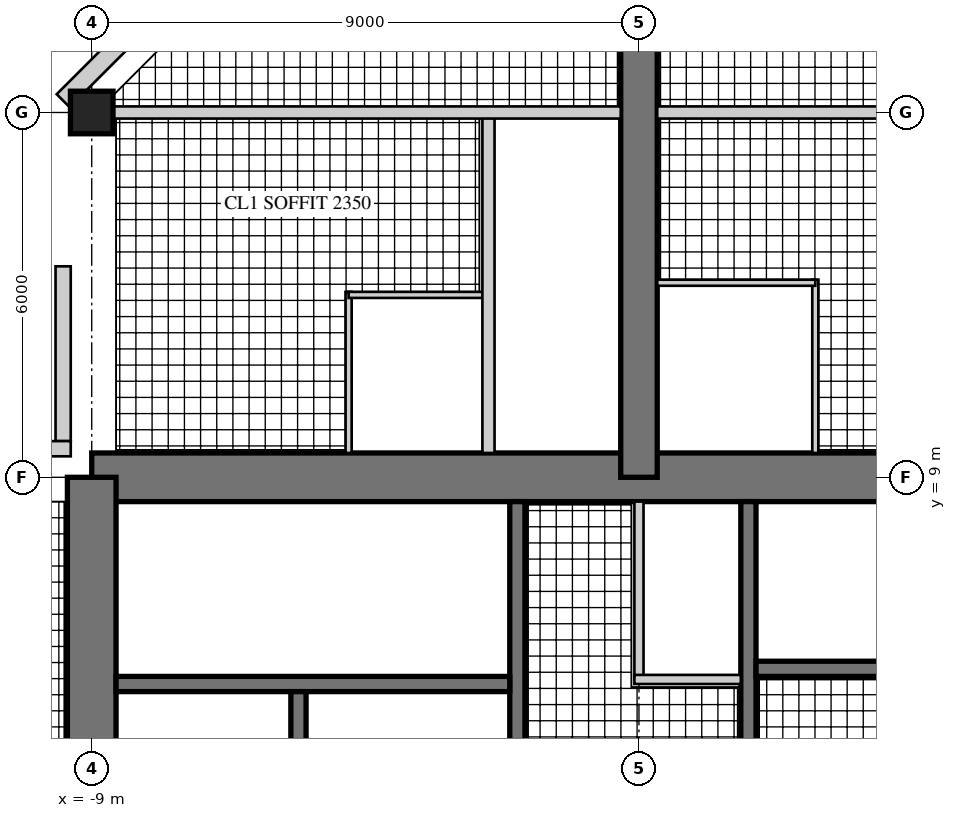
"""IFC4 building model, lengths in metres.
Left out: names, types, materials, properties, quantities, classifications, styles, units other than length and angle.
Written with IfcOpenShell. Run it as: python <this file> out.ifc"""

import sys

from ifc_helpers import new_model, si_unit, direction, frame, frame_2d, origin, origin_2d, place, context, subcontext, project, spatial, rectangle, hollow_rectangle, extrude, element, fill, save


model = new_model("IFC4")
c1 = context("Model", 3, precision=1e-05, world=origin(), true_north=direction((0.0, 1.0)))
c2 = subcontext(c1, "Body", "Model", "MODEL_VIEW")
j1 = project(units=[si_unit("LENGTHUNIT", "METRE"), si_unit("PLANEANGLEUNIT", "RADIAN")], contexts=[c1])
p1 = place(None, origin())
s1 = spatial("IfcSite", under=j1, at=p1, CompositionType="ELEMENT")
p2 = place(p1, origin())
s2 = spatial("IfcBuilding", under=s1, at=p2, CompositionType="ELEMENT")
p3 = place(p2, frame((0.0, 0.0, 267.9)))
s3 = spatial("IfcBuildingStorey", under=s2, at=p3, CompositionType="ELEMENT", Elevation=267.9)
p4 = place(p3, frame((9.0, 9.0, 0.0), z_axis=(0.0, 0.0, 1.0), x_axis=(-1.0, 0.0, 0.0)))
e1 = element("IfcWall", 1, at=p4, inside=s3, PredefinedType="SHEAR", context=c2, shape_type="SweptSolid", body=[
    extrude(rectangle(XDim=18.0, YDim=0.8, at=frame_2d((9.0, 0.0))), origin(), (0.0, 0.0, 1.0), 3.4),
])
p5 = place(p4, frame((9.8, 0.0, 0.0)))
e2 = element("IfcOpeningElement", 2, at=p5, cuts=e1, PredefinedType="OPENING", context=c2, shape_type="SweptSolid", body=[
    extrude(rectangle(XDim=1.0, YDim=2.4, at=frame_2d((0.5, 1.2))), frame((0.0, 0.41, 0.0), z_axis=(0.0, -1.0, 0.0), x_axis=(1.0, 0.0, 0.0)), (0.0, 0.0, 1.0), 0.82),
])
p6 = place(p3, frame((-9.0, 9.0, 0.0), z_axis=(0.0, 0.0, 1.0), x_axis=(0.0, -1.0, 0.0)))
e3 = element("IfcWall", 3, at=p6, inside=s3, PredefinedType="SHEAR", context=c2, shape_type="SweptSolid", body=[
    extrude(rectangle(XDim=18.0, YDim=0.8, at=frame_2d((9.0, 0.0))), origin(), (0.0, 0.0, 1.0), 3.4),
])
p7 = place(p6, frame((9.8, 0.0, 0.0)))
e4 = element("IfcOpeningElement", 4, at=p7, cuts=e3, PredefinedType="OPENING", context=c2, shape_type="SweptSolid", body=[
    extrude(rectangle(XDim=1.0, YDim=2.4, at=frame_2d((0.5, 1.2))), frame((0.0, 0.41, 0.0), z_axis=(0.0, -1.0, 0.0), x_axis=(1.0, 0.0, 0.0)), (0.0, 0.0, 1.0), 0.82),
])
p8 = place(p3, frame((1.8, 1.875, 0.0), z_axis=(0.0, 0.0, 1.0), x_axis=(0.0, 1.0, 0.0)))
e5 = element("IfcWall", 5, at=p8, inside=s3, PredefinedType="SHEAR", context=c2, shape_type="SweptSolid", body=[
    extrude(rectangle(XDim=6.725, YDim=0.25, at=frame_2d((3.363, 0.0))), origin(), (0.0, 0.0, 1.0), 3.4),
])
p9 = place(p8, frame((1.875, 0.0, 0.0)))
e6 = element("IfcOpeningElement", 6, at=p9, cuts=e5, PredefinedType="OPENING", context=c2, shape_type="SweptSolid", body=[
    extrude(rectangle(XDim=1.6, YDim=2.4, at=frame_2d((0.8, 1.2))), frame((0.0, 0.135, 0.0), z_axis=(0.0, -1.0, 0.0), x_axis=(1.0, 0.0, 0.0)), (0.0, 0.0, 1.0), 0.27),
])
p10 = place(p3, frame((1.925, 5.85, 0.0), z_axis=(0.0, 0.0, 1.0), x_axis=(1.0, 0.0, 0.0)))
e7 = element("IfcWall", 7, at=p10, inside=s3, PredefinedType="SHEAR", context=c2, shape_type="SweptSolid", body=[
    extrude(rectangle(XDim=6.675, YDim=0.25, at=frame_2d((3.337, 0.0))), origin(), (0.0, 0.0, 1.0), 3.4),
])
p11 = place(p10, frame((0.546, 0.0, 0.0)))
e8 = element("IfcOpeningElement", 8, at=p11, cuts=e7, PredefinedType="OPENING", context=c2, shape_type="SweptSolid", body=[
    extrude(rectangle(XDim=1.0, YDim=2.1, at=frame_2d((0.5, 1.05))), frame((0.0, 0.135, 0.0), z_axis=(0.0, -1.0, 0.0), x_axis=(1.0, 0.0, 0.0)), (0.0, 0.0, 1.0), 0.27),
])
p12 = place(p3, frame((-2.0, 1.675, 0.0), z_axis=(0.0, 0.0, 1.0), x_axis=(0.0, 1.0, 0.0)))
e9 = element("IfcWall", 9, at=p12, inside=s3, PredefinedType="SHEAR", context=c2, shape_type="SweptSolid", body=[
    extrude(rectangle(XDim=6.925, YDim=0.25, at=frame_2d((3.462, 0.0))), origin(), (0.0, 0.0, 1.0), 3.4),
])
p13 = place(p12, frame((0.725, 0.0, 0.0)))
e10 = element("IfcOpeningElement", 10, at=p13, cuts=e9, PredefinedType="OPENING", context=c2, shape_type="SweptSolid", body=[
    extrude(rectangle(XDim=1.0, YDim=2.1, at=frame_2d((0.5, 1.05))), frame((0.0, 0.135, 0.0), z_axis=(0.0, -1.0, 0.0), x_axis=(1.0, 0.0, 0.0)), (0.0, 0.0, 1.0), 0.27),
])
p14 = place(p3, frame((-2.125, 5.6, 0.0), z_axis=(0.0, 0.0, 1.0), x_axis=(-1.0, 0.0, 0.0)))
e11 = element("IfcWall", 11, at=p14, inside=s3, PredefinedType="SHEAR", context=c2, shape_type="SweptSolid", body=[
    extrude(rectangle(XDim=6.475, YDim=0.25, at=frame_2d((3.238, 0.0))), origin(), (0.0, 0.0, 1.0), 3.4),
])
p15 = place(p14, frame((0.175, 0.0, 0.0)))
e12 = element("IfcOpeningElement", 12, at=p15, cuts=e11, PredefinedType="OPENING", context=c2, shape_type="SweptSolid", body=[
    extrude(rectangle(XDim=1.0, YDim=2.1, at=frame_2d((0.5, 1.05))), frame((0.0, 0.135, 0.0), z_axis=(0.0, -1.0, 0.0), x_axis=(1.0, 0.0, 0.0)), (0.0, 0.0, 1.0), 0.27),
])
p16 = place(p3, frame((-5.6, 1.925, 0.0), z_axis=(0.0, 0.0, 1.0), x_axis=(0.0, 1.0, 0.0)))
e13 = element("IfcWall", 13, at=p16, inside=s3, PredefinedType="SHEAR", context=c2, shape_type="SweptSolid", body=[
    extrude(rectangle(XDim=3.55, YDim=0.25, at=frame_2d((1.775, 0.0))), origin(), (0.0, 0.0, 1.0), 3.4),
])
p17 = place(p16, frame((1.525, 0.0, 0.0)))
e14 = element("IfcOpeningElement", 14, at=p17, cuts=e13, PredefinedType="OPENING", context=c2, shape_type="SweptSolid", body=[
    extrude(rectangle(XDim=1.1, YDim=2.2, at=frame_2d((0.55, 1.1))), frame((0.0, 0.135, 0.0), z_axis=(0.0, -1.0, 0.0), x_axis=(1.0, 0.0, 0.0)), (0.0, 0.0, 1.0), 0.27),
])
p18 = place(p16, frame((0.075, 0.0, 0.0)))
e15 = element("IfcOpeningElement", 15, at=p18, cuts=e13, PredefinedType="OPENING", context=c2, shape_type="SweptSolid", body=[
    extrude(rectangle(XDim=0.8, YDim=2.1, at=frame_2d((0.4, 1.05))), frame((0.0, 0.135, 0.0), z_axis=(0.0, -1.0, 0.0), x_axis=(1.0, 0.0, 0.0)), (0.0, 0.0, 1.0), 0.27),
])
p19 = place(p3, frame((0.0, 9.0, 0.0), z_axis=(0.0, 0.0, 1.0), x_axis=(0.0, 1.0, 0.0)))
e16 = element("IfcWall", 16, at=p19, inside=s3, PredefinedType="SHEAR", context=c2, shape_type="SweptSolid", body=[
    extrude(rectangle(XDim=9.0, YDim=0.6, at=frame_2d((4.5, 0.0))), origin(), (0.0, 0.0, 1.0), 3.4),
])
p20 = place(p19, frame((3.8, 0.0, 0.0)))
e17 = element("IfcOpeningElement", 17, at=p20, cuts=e16, PredefinedType="OPENING", context=c2, shape_type="SweptSolid", body=[
    extrude(rectangle(XDim=1.0, YDim=2.15, at=frame_2d((0.5, 1.075))), frame((0.0, 0.31, 0.0), z_axis=(0.0, -1.0, 0.0), x_axis=(1.0, 0.0, 0.0)), (0.0, 0.0, 1.0), 0.62),
])
p21 = place(p19, frame((7.0, 0.0, 0.0)))
e18 = element("IfcOpeningElement", 18, at=p21, cuts=e16, PredefinedType="OPENING", context=c2, shape_type="SweptSolid", body=[
    extrude(rectangle(XDim=1.0, YDim=2.2, at=frame_2d((0.5, 1.1))), frame((0.0, 0.31, 0.0), z_axis=(0.0, -1.0, 0.0), x_axis=(1.0, 0.0, 0.0)), (0.0, 0.0, 1.0), 0.62),
])
p22 = place(p3, frame((-9.0, 15.0, 0.0), z_axis=(0.0, 0.0, 1.0), x_axis=(1.0, 0.0, 0.0)))
e19 = element("IfcColumn", 19, at=p22, inside=s3, PredefinedType="COLUMN", context=c2, shape_type="SweptSolid", body=[
    extrude(rectangle(XDim=0.7, YDim=0.7, at=origin_2d()), origin(), (0.0, 0.0, 1.0), 3.4),
])
p23 = place(p3, frame((-6.365, 18.3, 0.0), z_axis=(0.0, 0.0, 1.0), x_axis=(-0.70707898447, -0.707134576811, 0.0)))
e20 = element("IfcWall", 20, at=p23, inside=s3, PredefinedType="SOLIDWALL", context=c2, shape_type="SweptSolid", body=[
    extrude(rectangle(XDim=4.392, YDim=0.3, at=frame_2d((2.196, 0.0))), origin(), (0.0, 0.0, 1.0), 3.22),
])
p24 = place(p23, frame((1.746, 0.0, 0.3)))
e21 = element("IfcOpeningElement", 21, at=p24, cuts=e20, PredefinedType="OPENING", context=c2, shape_type="SweptSolid", body=[
    extrude(rectangle(XDim=0.9, YDim=2.4, at=frame_2d((0.45, 1.2))), frame((0.0, 0.16, 0.0), z_axis=(0.0, -1.0, 0.0), x_axis=(1.0, 0.0, 0.0)), (0.0, 0.0, 1.0), 0.32),
])
p25 = place(p3, frame((-9.47, 12.47, 0.0), z_axis=(0.0, 0.0, 1.0), x_axis=(0.0, -1.0, 0.0)))
e22 = element("IfcWall", 22, at=p25, inside=s3, PredefinedType="SOLIDWALL", context=c2, shape_type="SweptSolid", body=[
    extrude(rectangle(XDim=2.875, YDim=0.25, at=frame_2d((1.438, 0.0))), origin(), (0.0, 0.0, 1.0), 3.22),
])
p26 = place(p25, frame((0.6, 0.0, 0.0)))
e23 = element("IfcOpeningElement", 23, at=p26, cuts=e22, PredefinedType="OPENING", context=c2, shape_type="SweptSolid", body=[
    extrude(rectangle(XDim=1.0, YDim=2.2, at=frame_2d((0.5, 1.1))), frame((0.0, 0.135, 0.0), z_axis=(0.0, -1.0, 0.0), x_axis=(1.0, 0.0, 0.0)), (0.0, 0.0, 1.0), 0.27),
])
p27 = place(p3, frame((-9.345, 9.47, 0.0), z_axis=(0.0, 0.0, 1.0), x_axis=(-1.0, 0.0, 0.0)))
e24 = element("IfcWall", 24, at=p27, inside=s3, PredefinedType="SOLIDWALL", context=c2, shape_type="SweptSolid", body=[
    extrude(rectangle(XDim=3.125, YDim=0.25, at=frame_2d((1.562, 0.0))), origin(), (0.0, 0.0, 1.0), 3.22),
])
p28 = place(p27, frame((0.6, 0.0, 0.0)))
e25 = element("IfcOpeningElement", 25, at=p28, cuts=e24, PredefinedType="OPENING", context=c2, shape_type="SweptSolid", body=[
    extrude(rectangle(XDim=1.0, YDim=2.2, at=frame_2d((0.5, 1.1))), frame((0.0, 0.135, 0.0), z_axis=(0.0, -1.0, 0.0), x_axis=(1.0, 0.0, 0.0)), (0.0, 0.0, 1.0), 0.27),
])
p29 = place(p3, frame((0.0, 5.675, 0.0), z_axis=(0.0, 0.0, 1.0), x_axis=(0.0, 1.0, 0.0)))
e26 = element("IfcWall", 26, at=p29, inside=s3, PredefinedType="PARTITIONING", context=c2, shape_type="SweptSolid", body=[
    extrude(rectangle(XDim=2.925, YDim=0.15, at=frame_2d((1.462, 0.0))), origin(), (0.0, 0.0, 1.0), 3.22),
])
p30 = place(p29, frame((0.4, 0.0, 0.0)))
e27 = element("IfcOpeningElement", 27, at=p30, cuts=e26, PredefinedType="OPENING", context=c2, shape_type="SweptSolid", body=[
    extrude(rectangle(XDim=1.0, YDim=2.1, at=frame_2d((0.5, 1.05))), frame((0.0, 0.085, 0.0), z_axis=(0.0, -1.0, 0.0), x_axis=(1.0, 0.0, 0.0)), (0.0, 0.0, 1.0), 0.17),
])
p31 = place(p3, frame((1.675, 5.675, 0.0), z_axis=(0.0, 0.0, 1.0), x_axis=(-1.0, 0.0, 0.0)))
e28 = element("IfcWall", 28, at=p31, inside=s3, PredefinedType="PARTITIONING", context=c2, shape_type="SweptSolid", body=[
    extrude(rectangle(XDim=1.75, YDim=0.15, at=frame_2d((0.875, 0.0))), origin(), (0.0, 0.0, 1.0), 3.22),
])
p32 = place(p3, frame((-4.775, 9.4, 0.0), z_axis=(0.0, 0.0, 1.0), x_axis=(0.0, 1.0, 0.0)))
e29 = element("IfcWall", 29, at=p32, inside=s3, PredefinedType="PARTITIONING", context=c2, shape_type="SweptSolid", body=[
    extrude(rectangle(XDim=2.65, YDim=0.1, at=frame_2d((1.325, 0.0))), origin(), (0.0, 0.0, 1.0), 3.22),
])
p33 = place(p3, frame((-2.575, 12.0, 0.0), z_axis=(0.0, 0.0, 1.0), x_axis=(-1.0, 0.0, 0.0)))
e30 = element("IfcWall", 30, at=p33, inside=s3, PredefinedType="PARTITIONING", context=c2, shape_type="SweptSolid", body=[
    extrude(rectangle(XDim=2.2, YDim=0.1, at=frame_2d((1.1, 0.0))), origin(), (0.0, 0.0, 1.0), 3.22),
])
p34 = place(p33, frame((0.55, 0.0, 0.0)))
e31 = element("IfcOpeningElement", 31, at=p34, cuts=e30, PredefinedType="OPENING", context=c2, shape_type="SweptSolid", body=[
    extrude(rectangle(XDim=0.9, YDim=2.1, at=frame_2d((0.45, 1.05))), frame((0.0, 0.06, 0.0), z_axis=(0.0, -1.0, 0.0), x_axis=(1.0, 0.0, 0.0)), (0.0, 0.0, 1.0), 0.12),
])
p35 = place(p3, frame((2.9, 9.4, 0.0), z_axis=(0.0, 0.0, 1.0), x_axis=(0.0, 1.0, 0.0)))
e32 = element("IfcWall", 32, at=p35, inside=s3, PredefinedType="PARTITIONING", context=c2, shape_type="SweptSolid", body=[
    extrude(rectangle(XDim=2.85, YDim=0.1, at=frame_2d((1.425, 0.0))), origin(), (0.0, 0.0, 1.0), 3.22),
])
p36 = place(p3, frame((2.9, 12.2, 0.0), z_axis=(0.0, 0.0, 1.0), x_axis=(-1.0, 0.0, 0.0)))
e33 = element("IfcWall", 33, at=p36, inside=s3, PredefinedType="PARTITIONING", context=c2, shape_type="SweptSolid", body=[
    extrude(rectangle(XDim=2.6, YDim=0.1, at=frame_2d((1.3, 0.0))), origin(), (0.0, 0.0, 1.0), 3.22),
])
p37 = place(p36, frame((0.55, 0.0, 0.0)))
e34 = element("IfcOpeningElement", 34, at=p37, cuts=e33, PredefinedType="OPENING", context=c2, shape_type="SweptSolid", body=[
    extrude(rectangle(XDim=0.9, YDim=2.1, at=frame_2d((0.45, 1.05))), frame((0.0, 0.06, 0.0), z_axis=(0.0, -1.0, 0.0), x_axis=(1.0, 0.0, 0.0)), (0.0, 0.0, 1.0), 0.12),
])
p38 = place(p3, frame((-2.475, 9.4, 0.0), z_axis=(0.0, 0.0, 1.0), x_axis=(0.0, 1.0, 0.0)))
e35 = element("IfcWall", 35, at=p38, inside=s3, PredefinedType="SOLIDWALL", context=c2, shape_type="SweptSolid", body=[
    extrude(rectangle(XDim=5.6, YDim=0.2, at=frame_2d((2.8, 0.0))), origin(), (0.0, 0.0, 1.0), 3.22),
])
p39 = place(p38, frame((3.4, 0.0, 0.0)))
e36 = element("IfcOpeningElement", 36, at=p39, cuts=e35, PredefinedType="OPENING", context=c2, shape_type="SweptSolid", body=[
    extrude(rectangle(XDim=1.0, YDim=2.15, at=frame_2d((0.5, 1.075))), frame((0.0, 0.11, 0.0), z_axis=(0.0, -1.0, 0.0), x_axis=(1.0, 0.0, 0.0)), (0.0, 0.0, 1.0), 0.22),
])
p40 = place(p3, frame((8.65, 15.0, 0.0), z_axis=(0.0, 0.0, 1.0), x_axis=(-1.0, 0.0, 0.0)))
e37 = element("IfcWall", 37, at=p40, inside=s3, PredefinedType="SOLIDWALL", context=c2, shape_type="SweptSolid", body=[
    extrude(rectangle(XDim=8.35, YDim=0.2, at=frame_2d((4.175, 0.0))), origin(), (0.0, 0.0, 1.0), 2.52),
])
p41 = place(p3, frame((-0.3, 15.0, 0.0), z_axis=(0.0, 0.0, 1.0), x_axis=(-1.0, 0.0, 0.0)))
e38 = element("IfcWall", 38, at=p41, inside=s3, PredefinedType="SOLIDWALL", context=c2, shape_type="SweptSolid", body=[
    extrude(rectangle(XDim=8.35, YDim=0.2, at=frame_2d((4.175, 0.0))), origin(), (0.0, 0.0, 1.0), 2.52),
])
p42 = place(p41, frame((0.4, 0.0, 0.0)))
e39 = element("IfcOpeningElement", 39, at=p42, cuts=e38, PredefinedType="OPENING", context=c2, shape_type="SweptSolid", body=[
    extrude(rectangle(XDim=1.0, YDim=2.2, at=frame_2d((0.5, 1.1))), frame((0.0, 0.11, 0.0), z_axis=(0.0, -1.0, 0.0), x_axis=(1.0, 0.0, 0.0)), (0.0, 0.0, 1.0), 0.22),
])
p43 = place(p26, origin())
e40 = element("IfcDoor", 40, at=p43, inside=s3, OperationType="SINGLE_SWING_RIGHT", PredefinedType="DOOR", context=c2, shape_type="SweptSolid", body=[
    extrude(hollow_rectangle(XDim=1.0, YDim=2.2, WallThickness=0.06, at=frame_2d((0.5, 1.1))), frame((0.0, 0.025, 0.0), z_axis=(0.0, -1.0, 0.0), x_axis=(1.0, 0.0, 0.0)), (0.0, 0.0, 1.0), 0.05),
    extrude(rectangle(XDim=0.879, YDim=2.079, at=frame_2d((0.5, 1.1))), frame((0.0, 0.025, 0.0), z_axis=(0.0, -1.0, 0.0), x_axis=(1.0, 0.0, 0.0)), (0.0, 0.0, 1.0), 0.05),
])
fill(e23, e40)
p44 = place(p30, frame((1.0, 0.0, 0.0), z_axis=(0.0, 0.0, 1.0), x_axis=(-1.0, 0.0, 0.0)))
e41 = element("IfcDoor", 41, at=p44, inside=s3, OperationType="SINGLE_SWING_RIGHT", PredefinedType="DOOR", context=c2, shape_type="SweptSolid", body=[
    extrude(rectangle(XDim=1.0, YDim=2.1, at=frame_2d((0.5, 1.05))), frame((0.0, 0.025, 0.0), z_axis=(0.0, -1.0, 0.0), x_axis=(1.0, 0.0, 0.0)), (0.0, 0.0, 1.0), 0.05),
])
fill(e27, e41)
p45 = place(p34, origin())
e42 = element("IfcDoor", 42, at=p45, inside=s3, OperationType="SINGLE_SWING_LEFT", PredefinedType="DOOR", context=c2, shape_type="SweptSolid", body=[
    extrude(rectangle(XDim=0.9, YDim=2.1, at=frame_2d((0.45, 1.05))), frame((0.0, 0.025, 0.0), z_axis=(0.0, -1.0, 0.0), x_axis=(1.0, 0.0, 0.0)), (0.0, 0.0, 1.0), 0.05),
])
fill(e31, e42)
p46 = place(p37, origin())
e43 = element("IfcDoor", 43, at=p46, inside=s3, OperationType="SINGLE_SWING_LEFT", PredefinedType="DOOR", context=c2, shape_type="SweptSolid", body=[
    extrude(rectangle(XDim=0.9, YDim=2.1, at=frame_2d((0.45, 1.05))), frame((0.0, 0.025, 0.0), z_axis=(0.0, -1.0, 0.0), x_axis=(1.0, 0.0, 0.0)), (0.0, 0.0, 1.0), 0.05),
])
fill(e34, e43)
p47 = place(p39, origin())
e44 = element("IfcDoor", 44, at=p47, inside=s3, OperationType="SINGLE_SWING_LEFT", PredefinedType="DOOR", context=c2, shape_type="SweptSolid", body=[
    extrude(rectangle(XDim=1.0, YDim=2.15, at=frame_2d((0.5, 1.075))), frame((0.0, 0.025, 0.0), z_axis=(0.0, -1.0, 0.0), x_axis=(1.0, 0.0, 0.0)), (0.0, 0.0, 1.0), 0.05),
])
fill(e36, e44)
p48 = place(p42, frame((1.0, 0.0, 0.0), z_axis=(0.0, 0.0, 1.0), x_axis=(-1.0, 0.0, 0.0)))
e45 = element("IfcDoor", 45, at=p48, inside=s3, OperationType="SINGLE_SWING_RIGHT", PredefinedType="DOOR", context=c2, shape_type="SweptSolid", body=[
    extrude(rectangle(XDim=1.0, YDim=2.2, at=frame_2d((0.5, 1.1))), frame((0.0, 0.025, 0.0), z_axis=(0.0, -1.0, 0.0), x_axis=(1.0, 0.0, 0.0)), (0.0, 0.0, 1.0), 0.05),
])
fill(e39, e45)
p49 = place(p20, frame((1.0, 0.0, 0.0), z_axis=(0.0, 0.0, 1.0), x_axis=(-1.0, 0.0, 0.0)))
e46 = element("IfcDoor", 46, at=p49, inside=s3, OperationType="SINGLE_SWING_RIGHT", PredefinedType="DOOR", context=c2, shape_type="SweptSolid", body=[
    extrude(rectangle(XDim=1.0, YDim=2.15, at=frame_2d((0.5, 1.075))), frame((0.0, 0.025, 0.0), z_axis=(0.0, -1.0, 0.0), x_axis=(1.0, 0.0, 0.0)), (0.0, 0.0, 1.0), 0.05),
])
fill(e17, e46)
p50 = place(p5, origin())
e47 = element("IfcDoor", 47, at=p50, inside=s3, OperationType="SINGLE_SWING_RIGHT", PredefinedType="DOOR", context=c2, shape_type="SweptSolid", body=[
    extrude(rectangle(XDim=1.0, YDim=2.4, at=frame_2d((0.5, 1.2))), frame((0.0, 0.055, 0.0), z_axis=(0.0, -1.0, 0.0), x_axis=(1.0, 0.0, 0.0)), (0.0, 0.0, 1.0), 0.05),
])
fill(e2, e47)
p51 = place(p9, frame((1.6, 0.0, 0.0), z_axis=(0.0, 0.0, 1.0), x_axis=(-1.0, 0.0, 0.0)))
e48 = element("IfcDoor", 48, at=p51, inside=s3, OperationType="DOUBLE_DOOR_SINGLE_SWING", PredefinedType="DOOR", context=c2, shape_type="SweptSolid", body=[
    extrude(rectangle(XDim=1.6, YDim=2.4, at=frame_2d((0.8, 1.2))), frame((0.0, 0.025, 0.0), z_axis=(0.0, -1.0, 0.0), x_axis=(1.0, 0.0, 0.0)), (0.0, 0.0, 1.0), 0.05),
])
fill(e6, e48)
p52 = place(p15, frame((1.0, 0.0, 0.0), z_axis=(0.0, 0.0, 1.0), x_axis=(-1.0, 0.0, 0.0)))
e49 = element("IfcDoor", 49, at=p52, inside=s3, OperationType="SINGLE_SWING_RIGHT", PredefinedType="DOOR", context=c2, shape_type="SweptSolid", body=[
    extrude(rectangle(XDim=1.0, YDim=2.1, at=frame_2d((0.5, 1.05))), frame((0.0, 0.025, 0.0), z_axis=(0.0, -1.0, 0.0), x_axis=(1.0, 0.0, 0.0)), (0.0, 0.0, 1.0), 0.05),
])
fill(e12, e49)
p53 = place(p11, origin())
e50 = element("IfcDoor", 50, at=p53, inside=s3, OperationType="SINGLE_SWING_LEFT", PredefinedType="DOOR", context=c2, shape_type="SweptSolid", body=[
    extrude(rectangle(XDim=1.0, YDim=2.1, at=frame_2d((0.5, 1.05))), frame((0.0, 0.025, 0.0), z_axis=(0.0, -1.0, 0.0), x_axis=(1.0, 0.0, 0.0)), (0.0, 0.0, 1.0), 0.05),
])
fill(e8, e50)
save(model, sys.argv[1])
